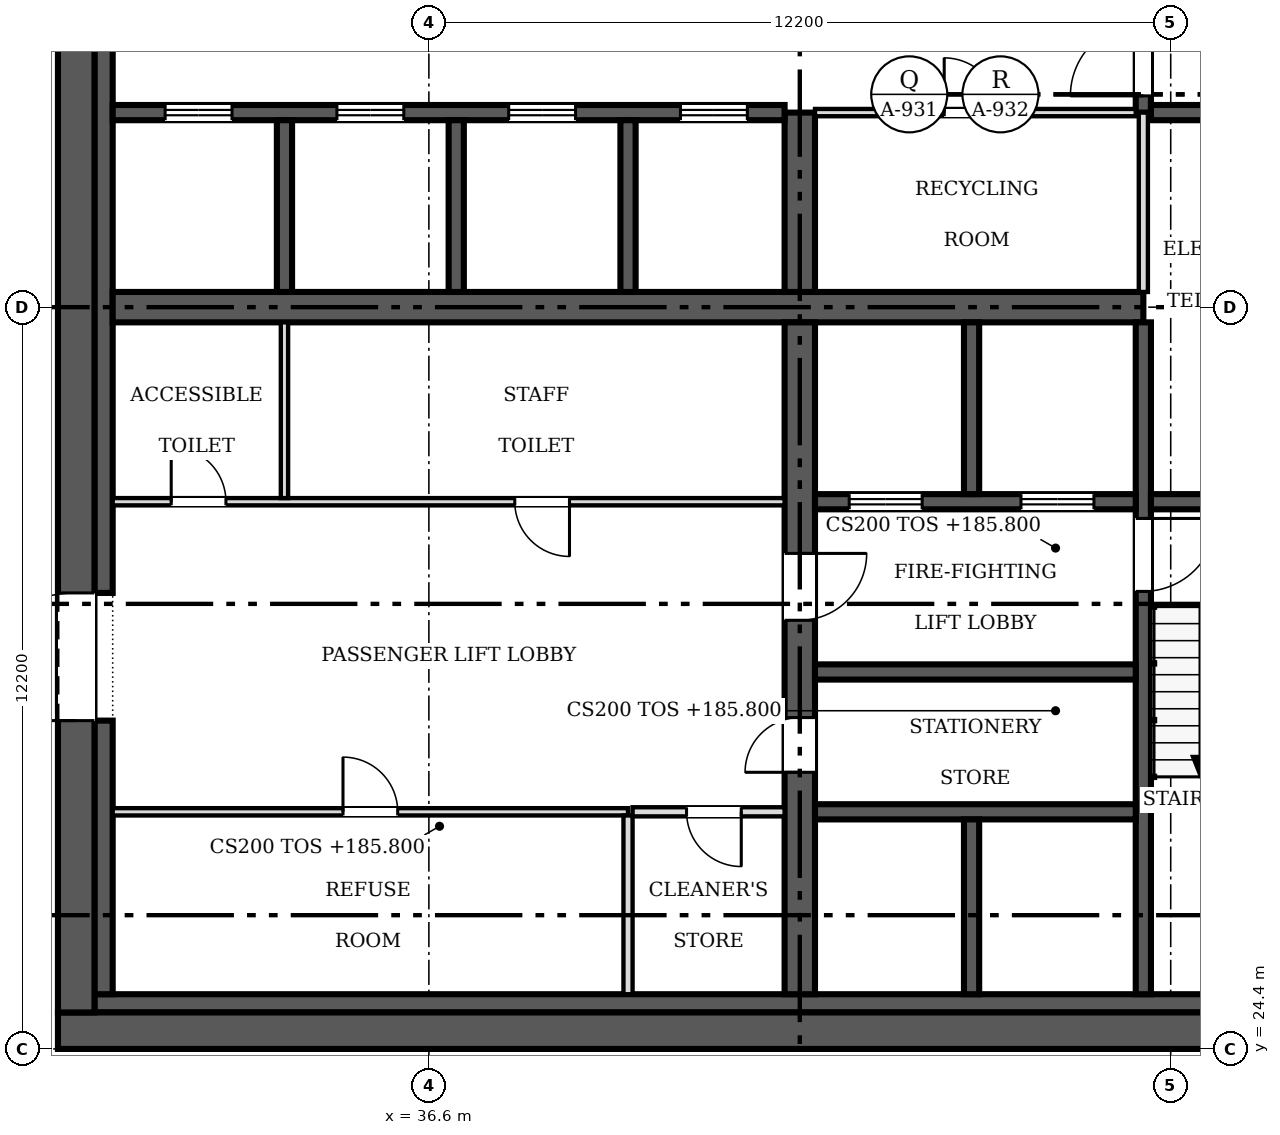
"""IFC4 building model, lengths in metres.
Left out: names, types, materials, properties, quantities, classifications, styles, units other than length and angle.
Written with IfcOpenShell. Run it as: python <this file> out.ifc"""

import sys

from ifc_helpers import new_model, si_unit, direction, frame, frame_2d, origin, place, context, subcontext, project, spatial, rectangle, extrude, source, transform, mapped, element, fill, save


model = new_model("IFC4")
c1 = context("Model", 3, precision=1e-05, world=origin(), true_north=direction((0.0, 1.0)))
c2 = subcontext(c1, "Body", "Model", "MODEL_VIEW")
j1 = project(units=[si_unit("LENGTHUNIT", "METRE"), si_unit("PLANEANGLEUNIT", "RADIAN")], contexts=[c1])
p1 = place(None, origin())
s1 = spatial("IfcSite", under=j1, at=p1, CompositionType="ELEMENT")
p2 = place(p1, origin())
s2 = spatial("IfcBuilding", under=s1, at=p2, CompositionType="ELEMENT")
p3 = place(p2, frame((0.0, 0.0, 185.8)))
s3 = spatial("IfcBuildingStorey", under=s2, at=p3, CompositionType="ELEMENT", Elevation=185.8)
p4 = place(p3, frame((54.9, 24.7, 0.0), z_axis=(0.0, 0.0, 1.0), x_axis=(-1.0, 0.0, 0.0)))
e1 = element("IfcWall", 1, at=p4, inside=s3, PredefinedType="SHEAR", context=c2, shape_type="SweptSolid", body=[
    extrude(rectangle(XDim=24.4, YDim=0.6, at=frame_2d((12.2, 0.0))), origin(), (0.0, 0.0, 1.0), 3.8),
])
m1 = source(origin(), c2, "Body", "SweptSolid", [
    extrude(rectangle(XDim=1.2, YDim=2.1, at=frame_2d((0.6, 1.05))), frame((0.0, 0.31, 0.0), z_axis=(0.0, -1.0, 0.0), x_axis=(1.0, 0.0, 0.0)), (0.0, 0.0, 1.0), 0.62),
])
p5 = place(p4, frame((1.5, 0.0, 0.0)))
e2 = element("IfcOpeningElement", 2, at=p5, cuts=e1, PredefinedType="OPENING", context=c2, shape_type="MappedRepresentation", body=[
    mapped(m1, transform((0.0, 0.0, 0.0), scale=1.0)),
])
p6 = place(p3, frame((30.8, 25.0, 0.0), z_axis=(0.0, 0.0, 1.0), x_axis=(0.0, 1.0, 0.0)))
e3 = element("IfcWall", 3, at=p6, inside=s3, PredefinedType="SHEAR", context=c2, shape_type="SweptSolid", body=[
    extrude(rectangle(XDim=23.2, YDim=0.6, at=frame_2d((11.6, 0.0))), origin(), (0.0, 0.0, 1.0), 3.8),
])
m2 = source(origin(), c2, "Body", "SweptSolid", [
    extrude(rectangle(XDim=2.1, YDim=2.4, at=frame_2d((1.05, 1.2))), frame((0.0, 0.31, 0.0), z_axis=(0.0, -1.0, 0.0), x_axis=(1.0, 0.0, 0.0)), (0.0, 0.0, 1.0), 0.62),
])
p7 = place(p6, frame((4.8, 0.0, 0.0)))
e4 = element("IfcOpeningElement", 4, at=p7, cuts=e3, PredefinedType="OPENING", context=c2, shape_type="MappedRepresentation", body=[
    mapped(m2, transform((0.0, 0.0, 0.0), scale=1.0)),
])
p8 = place(p6, frame((16.3, 0.0, 0.0)))
e5 = element("IfcOpeningElement", 5, at=p8, cuts=e3, PredefinedType="OPENING", context=c2, shape_type="MappedRepresentation", body=[
    mapped(m2, transform((0.0, 0.0, 0.0), scale=1.0)),
])
p9 = place(p3, frame((31.1, 25.15, 0.0), z_axis=(0.0, 0.0, 1.0), x_axis=(1.0, 0.0, 0.0)))
e6 = element("IfcWall", 6, at=p9, inside=s3, PredefinedType="SOLIDWALL", context=c2, shape_type="SweptSolid", body=[
    extrude(rectangle(XDim=21.1, YDim=0.3, at=frame_2d((10.55, 0.0))), origin(), (0.0, 0.0, 1.0), 3.8),
])
p10 = place(p3, frame((31.25, 25.3, 0.0), z_axis=(0.0, 0.0, 1.0), x_axis=(0.0, 1.0, 0.0)))
e7 = element("IfcWall", 7, at=p10, inside=s3, PredefinedType="SOLIDWALL", context=c2, shape_type="SweptSolid", body=[
    extrude(rectangle(XDim=4.5, YDim=0.3, at=frame_2d((2.25, 0.0))), origin(), (0.0, 0.0, 1.0), 3.8),
])
p11 = place(p3, frame((31.25, 31.9, 0.0), z_axis=(0.0, 0.0, 1.0), x_axis=(0.0, 1.0, 0.0)))
e8 = element("IfcWall", 8, at=p11, inside=s3, PredefinedType="SOLIDWALL", context=c2, shape_type="SweptSolid", body=[
    extrude(rectangle(XDim=9.4, YDim=0.3, at=frame_2d((4.7, 0.0))), origin(), (0.0, 0.0, 1.0), 3.8),
])
p12 = place(p3, frame((31.4, 36.6, 0.0), z_axis=(0.0, 0.0, 1.0), x_axis=(1.0, 0.0, 0.0)))
e9 = element("IfcWall", 9, at=p12, inside=s3, PredefinedType="SHEAR", context=c2, shape_type="SweptSolid", body=[
    extrude(rectangle(XDim=16.95, YDim=0.5, at=frame_2d((8.475, 0.0))), origin(), (0.0, 0.0, 1.0), 3.8),
])
p13 = place(p3, frame((42.7, 36.35, 0.0), z_axis=(0.0, 0.0, 1.0), x_axis=(0.0, -1.0, 0.0)))
e10 = element("IfcWall", 10, at=p13, inside=s3, PredefinedType="SHEAR", context=c2, shape_type="SweptSolid", body=[
    extrude(rectangle(XDim=11.05, YDim=0.5, at=frame_2d((5.525, 0.0))), origin(), (0.0, 0.0, 1.0), 3.8),
])
m3 = source(origin(), c2, "Body", "SweptSolid", [
    extrude(rectangle(XDim=0.9, YDim=2.1, at=frame_2d((0.45, 1.05))), frame((0.0, 0.26, 0.0), z_axis=(0.0, -1.0, 0.0), x_axis=(1.0, 0.0, 0.0)), (0.0, 0.0, 1.0), 0.52),
])
p14 = place(p13, frame((6.5, 0.0, 0.0)))
e11 = element("IfcOpeningElement", 11, at=p14, cuts=e10, PredefinedType="OPENING", context=c2, shape_type="MappedRepresentation", body=[
    mapped(m3, transform((0.0, 0.0, 0.0), scale=1.0)),
])
m4 = source(origin(), c2, "Body", "SweptSolid", [
    extrude(rectangle(XDim=1.1, YDim=2.1, at=frame_2d((0.55, 1.05))), frame((0.0, 0.26, 0.0), z_axis=(0.0, -1.0, 0.0), x_axis=(1.0, 0.0, 0.0)), (0.0, 0.0, 1.0), 0.52),
])
p15 = place(p13, frame((3.8, 0.0, 0.0)))
e12 = element("IfcOpeningElement", 12, at=p15, cuts=e10, PredefinedType="OPENING", context=c2, shape_type="MappedRepresentation", body=[
    mapped(m4, transform((0.0, 0.0, 0.0), scale=1.0)),
])
p16 = place(p3, frame((42.7, 36.85, 0.0), z_axis=(0.0, 0.0, 1.0), x_axis=(0.0, 1.0, 0.0)))
e13 = element("IfcWall", 13, at=p16, inside=s3, PredefinedType="SHEAR", context=c2, shape_type="SweptSolid", body=[
    extrude(rectangle(XDim=2.95, YDim=0.5, at=frame_2d((1.475, 0.0))), origin(), (0.0, 0.0, 1.0), 3.8),
])
p17 = place(p3, frame((31.4, 39.8, 0.0), z_axis=(0.0, 0.0, 1.0), x_axis=(1.0, 0.0, 0.0)))
e14 = element("IfcWall", 14, at=p17, inside=s3, PredefinedType="SOLIDWALL", context=c2, shape_type="SweptSolid", body=[
    extrude(rectangle(XDim=11.05, YDim=0.25, at=frame_2d((5.525, 0.0))), origin(), (0.0, 0.0, 1.0), 3.8),
])
m5 = source(origin(), c2, "Body", "SweptSolid", [
    extrude(rectangle(XDim=1.1, YDim=2.1, at=frame_2d((0.55, 1.05))), frame((0.0, 0.135, 0.0), z_axis=(0.0, -1.0, 0.0), x_axis=(1.0, 0.0, 0.0)), (0.0, 0.0, 1.0), 0.27),
])
p18 = place(p17, frame((0.863, 0.0, 0.0)))
e15 = element("IfcOpeningElement", 15, at=p18, cuts=e14, PredefinedType="OPENING", context=c2, shape_type="MappedRepresentation", body=[
    mapped(m5, transform((0.0, 0.0, 0.0), scale=1.0)),
])
p19 = place(p17, frame((3.688, 0.0, 0.0)))
e16 = element("IfcOpeningElement", 16, at=p19, cuts=e14, PredefinedType="OPENING", context=c2, shape_type="MappedRepresentation", body=[
    mapped(m5, transform((0.0, 0.0, 0.0), scale=1.0)),
])
p20 = place(p17, frame((6.512, 0.0, 0.0)))
e17 = element("IfcOpeningElement", 17, at=p20, cuts=e14, PredefinedType="OPENING", context=c2, shape_type="MappedRepresentation", body=[
    mapped(m5, transform((0.0, 0.0, 0.0), scale=1.0)),
])
p21 = place(p17, frame((9.337, 0.0, 0.0)))
e18 = element("IfcOpeningElement", 18, at=p21, cuts=e14, PredefinedType="OPENING", context=c2, shape_type="MappedRepresentation", body=[
    mapped(m5, transform((0.0, 0.0, 0.0), scale=1.0)),
])
p22 = place(p3, frame((48.35, 36.35, 0.0), z_axis=(0.0, 0.0, 1.0), x_axis=(0.0, -1.0, 0.0)))
e19 = element("IfcWall", 19, at=p22, inside=s3, PredefinedType="SOLIDWALL", context=c2, shape_type="SweptSolid", body=[
    extrude(rectangle(XDim=11.05, YDim=0.25, at=frame_2d((5.525, 0.0))), origin(), (0.0, 0.0, 1.0), 3.8),
])
m6 = source(origin(), c2, "Body", "SweptSolid", [
    extrude(rectangle(XDim=1.2, YDim=2.1, at=frame_2d((0.6, 1.05))), frame((0.0, 0.135, 0.0), z_axis=(0.0, -1.0, 0.0), x_axis=(1.0, 0.0, 0.0)), (0.0, 0.0, 1.0), 0.27),
])
p23 = place(p22, frame((3.225, 0.0, 0.0)))
e20 = element("IfcOpeningElement", 20, at=p23, cuts=e19, PredefinedType="OPENING", context=c2, shape_type="MappedRepresentation", body=[
    mapped(m6, transform((0.0, 0.0, 0.0), scale=1.0)),
])
p24 = place(p3, frame((48.225, 33.4, 0.0), z_axis=(0.0, 0.0, 1.0), x_axis=(-1.0, 0.0, 0.0)))
e21 = element("IfcWall", 21, at=p24, inside=s3, PredefinedType="SOLIDWALL", context=c2, shape_type="SweptSolid", body=[
    extrude(rectangle(XDim=5.275, YDim=0.25, at=frame_2d((2.638, 0.0))), origin(), (0.0, 0.0, 1.0), 3.8),
])
p25 = place(p24, frame((3.512, 0.0, 0.0)))
e22 = element("IfcOpeningElement", 22, at=p25, cuts=e21, PredefinedType="OPENING", context=c2, shape_type="MappedRepresentation", body=[
    mapped(m6, transform((0.0, 0.0, 0.0), scale=1.0)),
])
p26 = place(p24, frame((0.688, 0.0, 0.0)))
e23 = element("IfcOpeningElement", 23, at=p26, cuts=e21, PredefinedType="OPENING", context=c2, shape_type="MappedRepresentation", body=[
    mapped(m6, transform((0.0, 0.0, 0.0), scale=1.0)),
])
p27 = place(p3, frame((48.475, 33.4, 0.0), z_axis=(0.0, 0.0, 1.0), x_axis=(1.0, 0.0, 0.0)))
e24 = element("IfcWall", 24, at=p27, inside=s3, PredefinedType="SOLIDWALL", context=c2, shape_type="SweptSolid", body=[
    extrude(rectangle(XDim=3.525, YDim=0.25, at=frame_2d((1.762, 0.0))), origin(), (0.0, 0.0, 1.0), 3.8),
])
p28 = place(p3, frame((48.35, 47.9, 0.0), z_axis=(0.0, 0.0, 1.0), x_axis=(0.0, -1.0, 0.0)))
e25 = element("IfcWall", 25, at=p28, inside=s3, PredefinedType="SOLIDWALL", context=c2, shape_type="SweptSolid", body=[
    extrude(rectangle(XDim=8.1, YDim=0.25, at=frame_2d((4.05, 0.0))), origin(), (0.0, 0.0, 1.0), 3.8),
])
p29 = place(p28, frame((6.625, 0.0, 0.0)))
e26 = element("IfcOpeningElement", 26, at=p29, cuts=e25, PredefinedType="OPENING", context=c2, shape_type="MappedRepresentation", body=[
    mapped(m6, transform((0.0, 0.0, 0.0), scale=1.0)),
])
for number, where, z_axis, x_axis in (
    (27, (42.95, 28.3, 0.0), (0.0, 0.0, 1.0), (1.0, 0.0, 0.0)),
    (28, (42.95, 30.6, 0.0), (0.0, 0.0, 1.0), (1.0, 0.0, 0.0)),
):
    element("IfcWall", number, at=place(p3, frame(where, z_axis=z_axis, x_axis=x_axis)), inside=s3, PredefinedType="SOLIDWALL", context=c2, shape_type="SweptSolid", body=[
        extrude(rectangle(XDim=5.275, YDim=0.25, at=frame_2d((2.638, 0.0))), origin(), (0.0, 0.0, 1.0), 3.8),
    ])
p30 = place(p3, frame((48.475, 39.8, 0.0), z_axis=(0.0, 0.0, 1.0), x_axis=(1.0, 0.0, 0.0)))
e29 = element("IfcWall", 29, at=p30, inside=s3, PredefinedType="SOLIDWALL", context=c2, shape_type="SweptSolid", body=[
    extrude(rectangle(XDim=3.4, YDim=0.25, at=frame_2d((1.7, 0.0))), origin(), (0.0, 0.0, 1.0), 3.8),
])
for number, where, z_axis, x_axis in (
    (30, (34.225, 36.85, 0.0), (0.0, 0.0, 1.0), (0.0, 1.0, 0.0)),
    (31, (37.05, 36.85, 0.0), (0.0, 0.0, 1.0), (0.0, 1.0, 0.0)),
    (32, (39.875, 36.85, 0.0), (0.0, 0.0, 1.0), (0.0, 1.0, 0.0)),
):
    element("IfcWall", number, at=place(p3, frame(where, z_axis=z_axis, x_axis=x_axis)), inside=s3, PredefinedType="SOLIDWALL", context=c2, shape_type="SweptSolid", body=[
        extrude(rectangle(XDim=2.825, YDim=0.25, at=frame_2d((1.413, 0.0))), origin(), (0.0, 0.0, 1.0), 3.8),
    ])
p31 = place(p3, frame((45.525, 33.525, 0.0), z_axis=(0.0, 0.0, 1.0), x_axis=(0.0, 1.0, 0.0)))
e33 = element("IfcWall", 33, at=p31, inside=s3, PredefinedType="SOLIDWALL", context=c2, shape_type="SweptSolid", body=[
    extrude(rectangle(XDim=2.825, YDim=0.25, at=frame_2d((1.413, 0.0))), origin(), (0.0, 0.0, 1.0), 3.8),
])
p32 = place(p3, frame((45.525, 25.3, 0.0), z_axis=(0.0, 0.0, 1.0), x_axis=(0.0, 1.0, 0.0)))
e34 = element("IfcWall", 34, at=p32, inside=s3, PredefinedType="SOLIDWALL", context=c2, shape_type="SweptSolid", body=[
    extrude(rectangle(XDim=2.875, YDim=0.25, at=frame_2d((1.438, 0.0))), origin(), (0.0, 0.0, 1.0), 3.8),
])
p33 = place(p3, frame((31.4, 33.4, 0.0), z_axis=(0.0, 0.0, 1.0), x_axis=(1.0, 0.0, 0.0)))
e35 = element("IfcWall", 35, at=p33, inside=s3, PredefinedType="PARTITIONING", context=c2, shape_type="SweptSolid", body=[
    extrude(rectangle(XDim=11.05, YDim=0.12, at=frame_2d((5.525, 0.0))), origin(), (0.0, 0.0, 1.0), 3.6),
])
m7 = source(origin(), c2, "Body", "SweptSolid", [
    extrude(rectangle(XDim=0.9, YDim=2.1, at=frame_2d((0.45, 1.05))), frame((0.0, 0.07, 0.0), z_axis=(0.0, -1.0, 0.0), x_axis=(1.0, 0.0, 0.0)), (0.0, 0.0, 1.0), 0.14),
])
p34 = place(p33, frame((0.962, 0.0, 0.0)))
e36 = element("IfcOpeningElement", 36, at=p34, cuts=e35, PredefinedType="OPENING", context=c2, shape_type="MappedRepresentation", body=[
    mapped(m7, transform((0.0, 0.0, 0.0), scale=1.0)),
])
p35 = place(p33, frame((6.613, 0.0, 0.0)))
e37 = element("IfcOpeningElement", 37, at=p35, cuts=e35, PredefinedType="OPENING", context=c2, shape_type="MappedRepresentation", body=[
    mapped(m7, transform((0.0, 0.0, 0.0), scale=1.0)),
])
p36 = place(p3, frame((39.875, 28.3, 0.0), z_axis=(0.0, 0.0, 1.0), x_axis=(-1.0, 0.0, 0.0)))
e38 = element("IfcWall", 38, at=p36, inside=s3, PredefinedType="PARTITIONING", context=c2, shape_type="SweptSolid", body=[
    extrude(rectangle(XDim=8.475, YDim=0.12, at=frame_2d((4.238, 0.0))), origin(), (0.0, 0.0, 1.0), 3.6),
])
p37 = place(p36, frame((3.788, 0.0, 0.0)))
e39 = element("IfcOpeningElement", 39, at=p37, cuts=e38, PredefinedType="OPENING", context=c2, shape_type="MappedRepresentation", body=[
    mapped(m7, transform((0.0, 0.0, 0.0), scale=1.0)),
])
p38 = place(p3, frame((48.225, 39.8, 0.0), z_axis=(0.0, 0.0, 1.0), x_axis=(-1.0, 0.0, 0.0)))
e40 = element("IfcWall", 40, at=p38, inside=s3, PredefinedType="PARTITIONING", context=c2, shape_type="SweptSolid", body=[
    extrude(rectangle(XDim=5.275, YDim=0.12, at=frame_2d((2.638, 0.0))), origin(), (0.0, 0.0, 1.0), 3.6),
])
p39 = place(p38, frame((2.25, 0.0, 0.0)))
e41 = element("IfcOpeningElement", 41, at=p39, cuts=e40, PredefinedType="OPENING", context=c2, shape_type="MappedRepresentation", body=[
    mapped(m7, transform((0.0, 0.0, 0.0), scale=1.0)),
])
p40 = place(p3, frame((48.35, 36.85, 0.0), z_axis=(0.0, 0.0, 1.0), x_axis=(0.0, 1.0, 0.0)))
e42 = element("IfcWall", 42, at=p40, inside=s3, PredefinedType="PARTITIONING", context=c2, shape_type="SweptSolid", body=[
    extrude(rectangle(XDim=2.95, YDim=0.15, at=frame_2d((1.475, 0.0))), origin(), (0.0, 0.0, 1.0), 3.6),
])
p41 = place(p3, frame((34.225, 33.46, 0.0), z_axis=(0.0, 0.0, 1.0), x_axis=(0.0, 1.0, 0.0)))
e43 = element("IfcWall", 43, at=p41, inside=s3, PredefinedType="PARTITIONING", context=c2, shape_type="SweptSolid", body=[
    extrude(rectangle(XDim=2.89, YDim=0.12, at=frame_2d((1.445, 0.0))), origin(), (0.0, 0.0, 1.0), 3.6),
])
p42 = place(p3, frame((39.875, 25.3, 0.0), z_axis=(0.0, 0.0, 1.0), x_axis=(0.0, 1.0, 0.0)))
e44 = element("IfcWall", 44, at=p42, inside=s3, PredefinedType="PARTITIONING", context=c2, shape_type="SweptSolid", body=[
    extrude(rectangle(XDim=2.94, YDim=0.15, at=frame_2d((1.47, 0.0))), origin(), (0.0, 0.0, 1.0), 3.6),
])
p43 = place(p3, frame((42.45, 28.3, 0.0), z_axis=(0.0, 0.0, 1.0), x_axis=(-1.0, 0.0, 0.0)))
e45 = element("IfcWall", 45, at=p43, inside=s3, PredefinedType="PARTITIONING", context=c2, shape_type="SweptSolid", body=[
    extrude(rectangle(XDim=2.5, YDim=0.15, at=frame_2d((1.25, 0.0))), origin(), (0.0, 0.0, 1.0), 3.6),
])
m8 = source(origin(), c2, "Body", "SweptSolid", [
    extrude(rectangle(XDim=0.9, YDim=2.1, at=frame_2d((0.45, 1.05))), frame((0.0, 0.085, 0.0), z_axis=(0.0, -1.0, 0.0), x_axis=(1.0, 0.0, 0.0)), (0.0, 0.0, 1.0), 0.17),
])
p44 = place(p43, frame((0.712, 0.0, 0.0)))
e46 = element("IfcOpeningElement", 46, at=p44, cuts=e45, PredefinedType="OPENING", context=c2, shape_type="MappedRepresentation", body=[
    mapped(m8, transform((0.0, 0.0, 0.0), scale=1.0)),
])
m9 = source(origin(), c2, "Body", "SweptSolid", [
    extrude(rectangle(XDim=2.1, YDim=2.4, at=frame_2d((1.05, 1.2))), frame((0.0, 0.025, 0.0), z_axis=(0.0, -1.0, 0.0), x_axis=(1.0, 0.0, 0.0)), (0.0, 0.0, 1.0), 0.05),
])
p45 = place(p7, origin())
e47 = element("IfcDoor", 47, at=p45, inside=s3, OperationType="DOUBLE_DOOR_SINGLE_SWING", PredefinedType="DOOR", context=c2, shape_type="MappedRepresentation", body=[
    mapped(m9, transform((0.0, 0.0, 0.0), scale=1.0)),
])
fill(e4, e47)
m10 = source(origin(), c2, "Body", "SweptSolid", [
    extrude(rectangle(XDim=0.9, YDim=2.1, at=frame_2d((0.45, 1.05))), frame((0.0, 0.025, 0.0), z_axis=(0.0, -1.0, 0.0), x_axis=(1.0, 0.0, 0.0)), (0.0, 0.0, 1.0), 0.05),
])
p46 = place(p14, origin())
e48 = element("IfcDoor", 48, at=p46, inside=s3, OperationType="SINGLE_SWING_RIGHT", PredefinedType="DOOR", context=c2, shape_type="MappedRepresentation", body=[
    mapped(m10, transform((0.0, 0.0, 0.0), scale=1.0)),
])
fill(e11, e48)
m11 = source(origin(), c2, "Body", "SweptSolid", [
    extrude(rectangle(XDim=1.1, YDim=2.1, at=frame_2d((0.55, 1.05))), frame((0.0, 0.025, 0.0), z_axis=(0.0, -1.0, 0.0), x_axis=(1.0, 0.0, 0.0)), (0.0, 0.0, 1.0), 0.05),
])
p47 = place(p15, origin())
e49 = element("IfcDoor", 49, at=p47, inside=s3, OperationType="SINGLE_SWING_LEFT", PredefinedType="DOOR", context=c2, shape_type="MappedRepresentation", body=[
    mapped(m11, transform((0.0, 0.0, 0.0), scale=1.0)),
])
fill(e12, e49)
p48 = place(p18, origin())
e50 = element("IfcDoor", 50, at=p48, inside=s3, OperationType="DOUBLE_DOOR_SLIDING", PredefinedType="DOOR", context=c2, shape_type="MappedRepresentation", body=[
    mapped(m11, transform((0.0, 0.0, 0.0), scale=1.0)),
])
fill(e15, e50)
p49 = place(p19, origin())
e51 = element("IfcDoor", 51, at=p49, inside=s3, OperationType="DOUBLE_DOOR_SLIDING", PredefinedType="DOOR", context=c2, shape_type="MappedRepresentation", body=[
    mapped(m11, transform((0.0, 0.0, 0.0), scale=1.0)),
])
fill(e16, e51)
p50 = place(p20, origin())
e52 = element("IfcDoor", 52, at=p50, inside=s3, OperationType="DOUBLE_DOOR_SLIDING", PredefinedType="DOOR", context=c2, shape_type="MappedRepresentation", body=[
    mapped(m11, transform((0.0, 0.0, 0.0), scale=1.0)),
])
fill(e17, e52)
p51 = place(p21, origin())
e53 = element("IfcDoor", 53, at=p51, inside=s3, OperationType="DOUBLE_DOOR_SLIDING", PredefinedType="DOOR", context=c2, shape_type="MappedRepresentation", body=[
    mapped(m11, transform((0.0, 0.0, 0.0), scale=1.0)),
])
fill(e18, e53)
m12 = source(origin(), c2, "Body", "SweptSolid", [
    extrude(rectangle(XDim=1.2, YDim=2.1, at=frame_2d((0.6, 1.05))), frame((0.0, 0.025, 0.0), z_axis=(0.0, -1.0, 0.0), x_axis=(1.0, 0.0, 0.0)), (0.0, 0.0, 1.0), 0.05),
])
p52 = place(p23, origin())
e54 = element("IfcDoor", 54, at=p52, inside=s3, OperationType="SINGLE_SWING_LEFT", PredefinedType="DOOR", context=c2, shape_type="MappedRepresentation", body=[
    mapped(m12, transform((0.0, 0.0, 0.0), scale=1.0)),
])
fill(e20, e54)
p53 = place(p25, origin())
e55 = element("IfcDoor", 55, at=p53, inside=s3, OperationType="DOUBLE_DOOR_SLIDING", PredefinedType="DOOR", context=c2, shape_type="MappedRepresentation", body=[
    mapped(m12, transform((0.0, 0.0, 0.0), scale=1.0)),
])
fill(e22, e55)
p54 = place(p26, origin())
e56 = element("IfcDoor", 56, at=p54, inside=s3, OperationType="DOUBLE_DOOR_SLIDING", PredefinedType="DOOR", context=c2, shape_type="MappedRepresentation", body=[
    mapped(m12, transform((0.0, 0.0, 0.0), scale=1.0)),
])
fill(e23, e56)
p55 = place(p29, origin())
e57 = element("IfcDoor", 57, at=p55, inside=s3, OperationType="SINGLE_SWING_RIGHT", PredefinedType="DOOR", context=c2, shape_type="MappedRepresentation", body=[
    mapped(m12, transform((0.0, 0.0, 0.0), scale=1.0)),
])
fill(e26, e57)
p56 = place(p34, origin())
e58 = element("IfcDoor", 58, at=p56, inside=s3, OperationType="SINGLE_SWING_LEFT", PredefinedType="DOOR", context=c2, shape_type="MappedRepresentation", body=[
    mapped(m10, transform((0.0, 0.0, 0.0), scale=1.0)),
])
fill(e36, e58)
p57 = place(p35, origin())
e59 = element("IfcDoor", 59, at=p57, inside=s3, OperationType="SINGLE_SWING_RIGHT", PredefinedType="DOOR", context=c2, shape_type="MappedRepresentation", body=[
    mapped(m10, transform((0.0, 0.0, 0.0), scale=1.0)),
])
fill(e37, e59)
p58 = place(p37, origin())
e60 = element("IfcDoor", 60, at=p58, inside=s3, OperationType="SINGLE_SWING_RIGHT", PredefinedType="DOOR", context=c2, shape_type="MappedRepresentation", body=[
    mapped(m10, transform((0.0, 0.0, 0.0), scale=1.0)),
])
fill(e39, e60)
p59 = place(p39, origin())
e61 = element("IfcDoor", 61, at=p59, inside=s3, OperationType="SINGLE_SWING_RIGHT", PredefinedType="DOOR", context=c2, shape_type="MappedRepresentation", body=[
    mapped(m10, transform((0.0, 0.0, 0.0), scale=1.0)),
])
fill(e41, e61)
p60 = place(p44, origin())
e62 = element("IfcDoor", 62, at=p60, inside=s3, OperationType="SINGLE_SWING_LEFT", PredefinedType="DOOR", context=c2, shape_type="MappedRepresentation", body=[
    mapped(m10, transform((0.0, 0.0, 0.0), scale=1.0)),
])
fill(e46, e62)
save(model, sys.argv[1])
